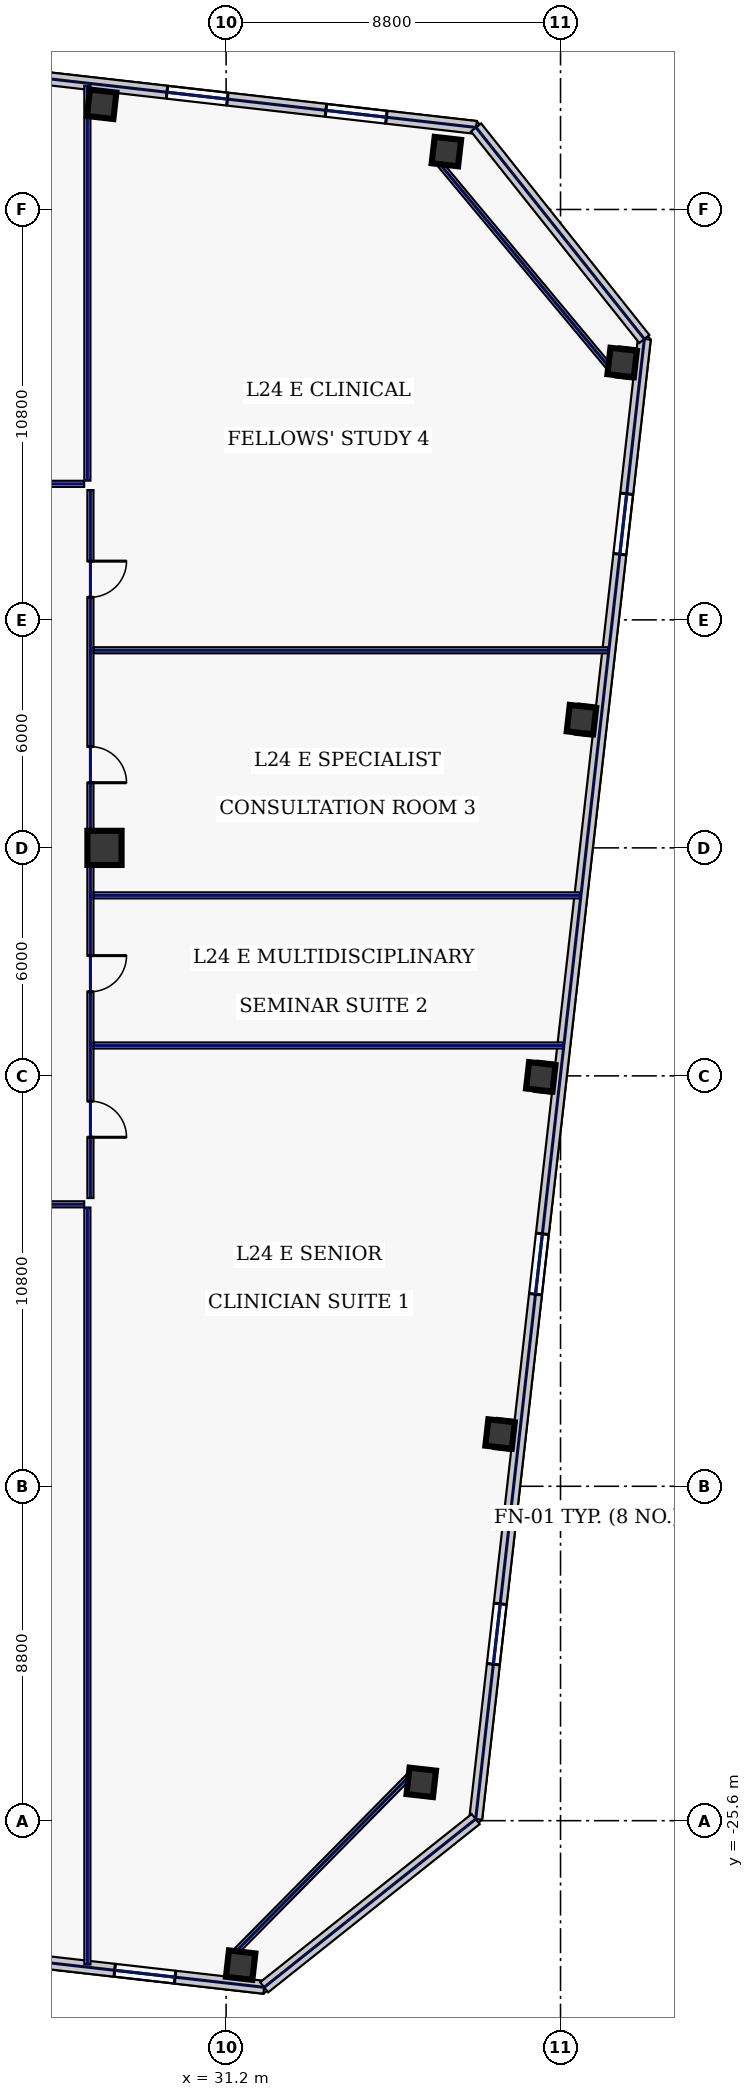
"""IFC4 building model, lengths in metres.
Left out: names, types, materials, properties, quantities, classifications, styles, units other than length and angle.
Written with IfcOpenShell. Run it as: python <this file> out.ifc"""

import sys

from ifc_helpers import new_model, si_unit, direction, frame, frame_2d, origin, origin_2d, place, context, subcontext, project, spatial, rectangle, hollow_rectangle, extrude, element, fill, save


model = new_model("IFC4")
c1 = context("Model", 3, precision=1e-05, world=origin(), true_north=direction((0.0, 1.0)))
c2 = subcontext(c1, "Body", "Model", "MODEL_VIEW")
j1 = project(units=[si_unit("LENGTHUNIT", "METRE"), si_unit("PLANEANGLEUNIT", "RADIAN")], contexts=[c1])
p1 = place(None, origin())
s1 = spatial("IfcSite", under=j1, at=p1, CompositionType="ELEMENT")
p2 = place(p1, origin())
s2 = spatial("IfcBuilding", under=s1, at=p2, CompositionType="ELEMENT")
p3 = place(p2, frame((0.0, 0.0, 109.4)))
s3 = spatial("IfcBuildingStorey", under=s2, at=p3, CompositionType="ELEMENT", Elevation=109.4)
p4 = place(p3, frame((28.0, 0.0, 0.0), z_axis=(0.0, 0.0, 1.0), x_axis=(1.0, 0.0, 0.0)))
e1 = element("IfcColumn", 1, at=p4, inside=s3, PredefinedType="COLUMN", context=c2, shape_type="SweptSolid", body=[
    extrude(hollow_rectangle(XDim=0.9, YDim=0.9, WallThickness=0.04, at=origin_2d()), origin(), (0.0, 0.0, 1.0), 3.74),
])
for number, where, z_axis, x_axis in (
    (2, (31.583, -29.401, 0.0), (0.0, 0.0, 1.0), (0.994, -0.113, 0.0)),
    (3, (36.997, 18.323, 0.0), (0.0, 0.0, 1.0), (0.994, -0.113, 0.0)),
    (4, (27.926, 19.568, 0.0), (0.0, 0.0, 1.0), (0.994, -0.113, 0.0)),
    (5, (36.336, -24.592, 0.0), (0.0, 0.0, 1.0), (0.994, -0.113, 0.0)),
    (6, (38.409, -15.424, 0.0), (0.0, 0.0, 1.0), (0.994, -0.113, 0.0)),
    (7, (39.48, -6.025, 0.0), (0.0, 0.0, 1.0), (0.994, -0.113, 0.0)),
    (8, (40.551, 3.375, 0.0), (0.0, 0.0, 1.0), (0.994, -0.113, 0.0)),
    (9, (41.622, 12.774, 0.0), (0.0, 0.0, 1.0), (0.994, -0.113, 0.0)),
):
    element("IfcColumn", number, at=place(p3, frame(where, z_axis=z_axis, x_axis=x_axis)), inside=s3, PredefinedType="COLUMN", context=c2, shape_type="SweptSolid", body=[
        extrude(hollow_rectangle(XDim=0.7, YDim=0.7, WallThickness=0.032, at=origin_2d()), origin(), (0.0, 0.0, 1.0), 3.74),
    ])
p5 = place(p3, frame((11.115, -27.582, 0.0), z_axis=(0.0, 0.0, 1.0), x_axis=(0.993572655904, -0.113196190044, 0.0)))
e10 = element("IfcWall", 10, at=p5, inside=s3, PredefinedType="STANDARD", context=c2, shape_type="SweptSolid", body=[
    extrude(rectangle(XDim=21.223, YDim=0.34, at=frame_2d((10.611, 0.0))), origin(), (0.0, 0.0, 1.0), 3.74),
])
p6 = place(p5, frame((13.044, 0.0, 0.22)))
e11 = element("IfcOpeningElement", 11, at=p6, cuts=e10, PredefinedType="OPENING", context=c2, shape_type="SweptSolid", body=[
    extrude(rectangle(XDim=1.6, YDim=1.2, at=frame_2d((0.8, 0.6))), frame((0.0, 0.18, 0.0), z_axis=(0.0, -1.0, 0.0), x_axis=(1.0, 0.0, 0.0)), (0.0, 0.0, 1.0), 0.36),
])
p7 = place(p5, frame((17.265, 0.0, 0.22)))
e12 = element("IfcOpeningElement", 12, at=p7, cuts=e10, PredefinedType="OPENING", context=c2, shape_type="SweptSolid", body=[
    extrude(rectangle(XDim=1.6, YDim=1.2, at=frame_2d((0.8, 0.6))), frame((0.0, 0.18, 0.0), z_axis=(0.0, -1.0, 0.0), x_axis=(1.0, 0.0, 0.0)), (0.0, 0.0, 1.0), 0.36),
])
p8 = place(p3, frame((37.777, 18.958, 0.0), z_axis=(0.0, 0.0, 1.0), x_axis=(-0.993571362037, 0.113207546299, 0.0)))
e13 = element("IfcWall", 13, at=p8, inside=s3, PredefinedType="STANDARD", context=c2, shape_type="SweptSolid", body=[
    extrude(rectangle(XDim=21.223, YDim=0.34, at=frame_2d((10.611, 0.0))), origin(), (0.0, 0.0, 1.0), 3.74),
])
p9 = place(p8, frame((11.535, 0.0, 0.22)))
e14 = element("IfcOpeningElement", 14, at=p9, cuts=e13, PredefinedType="OPENING", context=c2, shape_type="SweptSolid", body=[
    extrude(rectangle(XDim=1.6, YDim=1.2, at=frame_2d((0.8, 0.6))), frame((0.0, 0.18, 0.0), z_axis=(0.0, -1.0, 0.0), x_axis=(1.0, 0.0, 0.0)), (0.0, 0.0, 1.0), 0.36),
])
p10 = place(p8, frame((6.586, 0.0, 0.22)))
e15 = element("IfcOpeningElement", 15, at=p10, cuts=e13, PredefinedType="OPENING", context=c2, shape_type="SweptSolid", body=[
    extrude(rectangle(XDim=1.6, YDim=1.2, at=frame_2d((0.8, 0.6))), frame((0.0, 0.18, 0.0), z_axis=(0.0, -1.0, 0.0), x_axis=(1.0, 0.0, 0.0)), (0.0, 0.0, 1.0), 0.36),
])
p11 = place(p8, frame((2.375, 0.0, 0.22)))
e16 = element("IfcOpeningElement", 16, at=p11, cuts=e13, PredefinedType="OPENING", context=c2, shape_type="SweptSolid", body=[
    extrude(rectangle(XDim=1.6, YDim=1.2, at=frame_2d((0.8, 0.6))), frame((0.0, 0.18, 0.0), z_axis=(0.0, -1.0, 0.0), x_axis=(1.0, 0.0, 0.0)), (0.0, 0.0, 1.0), 0.36),
])
p12 = place(p3, frame((37.768, -25.556, 0.0), z_axis=(0.0, 0.0, 1.0), x_axis=(0.113201605824, 0.993572038877, 0.0)))
e17 = element("IfcWall", 17, at=p12, inside=s3, PredefinedType="STANDARD", context=c2, shape_type="SweptSolid", body=[
    extrude(rectangle(XDim=39.2, YDim=0.34, at=frame_2d((19.6, 0.0))), origin(), (0.0, 0.0, 1.0), 3.74),
])
p13 = place(p12, frame((4.1, 0.0, 0.22)))
e18 = element("IfcOpeningElement", 18, at=p13, cuts=e17, PredefinedType="OPENING", context=c2, shape_type="SweptSolid", body=[
    extrude(rectangle(XDim=1.6, YDim=1.2, at=frame_2d((0.8, 0.6))), frame((0.0, 0.18, 0.0), z_axis=(0.0, -1.0, 0.0), x_axis=(1.0, 0.0, 0.0)), (0.0, 0.0, 1.0), 0.36),
])
p14 = place(p12, frame((13.9, 0.0, 0.22)))
e19 = element("IfcOpeningElement", 19, at=p14, cuts=e17, PredefinedType="OPENING", context=c2, shape_type="SweptSolid", body=[
    extrude(rectangle(XDim=1.6, YDim=1.2, at=frame_2d((0.8, 0.6))), frame((0.0, 0.18, 0.0), z_axis=(0.0, -1.0, 0.0), x_axis=(1.0, 0.0, 0.0)), (0.0, 0.0, 1.0), 0.36),
])
p15 = place(p12, frame((33.5, 0.0, 0.22)))
e20 = element("IfcOpeningElement", 20, at=p15, cuts=e17, PredefinedType="OPENING", context=c2, shape_type="SweptSolid", body=[
    extrude(rectangle(XDim=1.6, YDim=1.2, at=frame_2d((0.8, 0.6))), frame((0.0, 0.18, 0.0), z_axis=(0.0, -1.0, 0.0), x_axis=(1.0, 0.0, 0.0)), (0.0, 0.0, 1.0), 0.36),
])
p16 = place(p3, frame((32.201, -29.985, 0.0), z_axis=(0.0, 0.0, 1.0), x_axis=(0.78261359446, 0.622507800567, 0.0)))
e21 = element("IfcWall", 21, at=p16, inside=s3, PredefinedType="STANDARD", context=c2, shape_type="SweptSolid", body=[
    extrude(rectangle(XDim=7.114, YDim=0.34, at=frame_2d((3.557, 0.0))), origin(), (0.0, 0.0, 1.0), 3.74),
])
p17 = place(p3, frame((42.206, 13.392, 0.0), z_axis=(0.0, 0.0, 1.0), x_axis=(-0.622524521309, 0.782600294128, 0.0)))
e22 = element("IfcWall", 22, at=p17, inside=s3, PredefinedType="STANDARD", context=c2, shape_type="SweptSolid", body=[
    extrude(rectangle(XDim=7.113, YDim=0.34, at=frame_2d((3.557, 0.0))), origin(), (0.0, 0.0, 1.0), 3.74),
])
p18 = place(p3, frame((31.341, -29.162, 0.0), z_axis=(0.0, 0.0, 1.0), x_axis=(0.702905898933, 0.711282853192, 0.0)))
e23 = element("IfcWall", 23, at=p18, inside=s3, PredefinedType="PARTITIONING", context=c2, shape_type="SweptSolid", body=[
    extrude(rectangle(XDim=6.761, YDim=0.16, at=frame_2d((3.381, 0.0))), origin(), (0.0, 0.0, 1.0), 1.535),
])
p19 = place(p3, frame((41.361, 12.556, 0.0), z_axis=(0.0, 0.0, 1.0), x_axis=(-0.640217638562, 0.768193579298, 0.0)))
e24 = element("IfcWall", 24, at=p19, inside=s3, PredefinedType="PARTITIONING", context=c2, shape_type="SweptSolid", body=[
    extrude(rectangle(XDim=7.224, YDim=0.16, at=frame_2d((3.612, 0.0))), origin(), (0.0, 0.0, 1.0), 1.535),
])
p20 = place(p3, frame((-27.465, 9.58, 0.0), z_axis=(0.0, 0.0, 1.0), x_axis=(1.0, 0.0, 0.0)))
e25 = element("IfcWall", 25, at=p20, inside=s3, PredefinedType="PARTITIONING", context=c2, shape_type="SweptSolid", body=[
    extrude(rectangle(XDim=54.93, YDim=0.16, at=frame_2d((27.465, 0.0))), origin(), (0.0, 0.0, 1.0), 3.74),
])
p21 = place(p20, frame((1.869, 0.0, 0.0)))
e26 = element("IfcOpeningElement", 26, at=p21, cuts=e25, PredefinedType="OPENING", context=c2, shape_type="SweptSolid", body=[
    extrude(rectangle(XDim=1.3, YDim=2.2, at=frame_2d((0.65, 1.1))), frame((0.0, 0.09, 0.0), z_axis=(0.0, -1.0, 0.0), x_axis=(1.0, 0.0, 0.0)), (0.0, 0.0, 1.0), 0.18),
])
p22 = place(p20, frame((6.375, 0.0, 0.0)))
e27 = element("IfcOpeningElement", 27, at=p22, cuts=e25, PredefinedType="OPENING", context=c2, shape_type="SweptSolid", body=[
    extrude(rectangle(XDim=0.95, YDim=2.2, at=frame_2d((0.475, 1.1))), frame((0.0, 0.09, 0.0), z_axis=(0.0, -1.0, 0.0), x_axis=(1.0, 0.0, 0.0)), (0.0, 0.0, 1.0), 0.18),
])
p23 = place(p20, frame((13.1, 0.0, 0.0)))
e28 = element("IfcOpeningElement", 28, at=p23, cuts=e25, PredefinedType="OPENING", context=c2, shape_type="SweptSolid", body=[
    extrude(rectangle(XDim=1.3, YDim=2.2, at=frame_2d((0.65, 1.1))), frame((0.0, 0.09, 0.0), z_axis=(0.0, -1.0, 0.0), x_axis=(1.0, 0.0, 0.0)), (0.0, 0.0, 1.0), 0.18),
])
p24 = place(p20, frame((23.225, 0.0, 0.0)))
e29 = element("IfcOpeningElement", 29, at=p24, cuts=e25, PredefinedType="OPENING", context=c2, shape_type="SweptSolid", body=[
    extrude(rectangle(XDim=0.95, YDim=2.2, at=frame_2d((0.475, 1.1))), frame((0.0, 0.09, 0.0), z_axis=(0.0, -1.0, 0.0), x_axis=(1.0, 0.0, 0.0)), (0.0, 0.0, 1.0), 0.18),
])
p25 = place(p20, frame((33.725, 0.0, 0.0)))
e30 = element("IfcOpeningElement", 30, at=p25, cuts=e25, PredefinedType="OPENING", context=c2, shape_type="SweptSolid", body=[
    extrude(rectangle(XDim=0.95, YDim=2.2, at=frame_2d((0.475, 1.1))), frame((0.0, 0.09, 0.0), z_axis=(0.0, -1.0, 0.0), x_axis=(1.0, 0.0, 0.0)), (0.0, 0.0, 1.0), 0.18),
])
p26 = place(p20, frame((43.325, 0.0, 0.0)))
e31 = element("IfcOpeningElement", 31, at=p26, cuts=e25, PredefinedType="OPENING", context=c2, shape_type="SweptSolid", body=[
    extrude(rectangle(XDim=1.05, YDim=2.2, at=frame_2d((0.525, 1.1))), frame((0.0, 0.09, 0.0), z_axis=(0.0, -1.0, 0.0), x_axis=(1.0, 0.0, 0.0)), (0.0, 0.0, 1.0), 0.18),
])
p27 = place(p20, frame((50.781, 0.0, 0.0)))
e32 = element("IfcOpeningElement", 32, at=p27, cuts=e25, PredefinedType="OPENING", context=c2, shape_type="SweptSolid", body=[
    extrude(rectangle(XDim=1.3, YDim=2.2, at=frame_2d((0.65, 1.1))), frame((0.0, 0.09, 0.0), z_axis=(0.0, -1.0, 0.0), x_axis=(1.0, 0.0, 0.0)), (0.0, 0.0, 1.0), 0.18),
])
p28 = place(p3, frame((27.63, 9.415, 0.0), z_axis=(0.0, 0.0, 1.0), x_axis=(0.0, -1.0, 0.0)))
e33 = element("IfcWall", 33, at=p28, inside=s3, PredefinedType="PARTITIONING", context=c2, shape_type="SweptSolid", body=[
    extrude(rectangle(XDim=18.63, YDim=0.16, at=frame_2d((9.315, 0.0))), origin(), (0.0, 0.0, 1.0), 3.74),
])
p29 = place(p28, frame((16.081, 0.0, 0.0)))
e34 = element("IfcOpeningElement", 34, at=p29, cuts=e33, PredefinedType="OPENING", context=c2, shape_type="SweptSolid", body=[
    extrude(rectangle(XDim=0.95, YDim=2.2, at=frame_2d((0.475, 1.1))), frame((0.0, 0.09, 0.0), z_axis=(0.0, -1.0, 0.0), x_axis=(1.0, 0.0, 0.0)), (0.0, 0.0, 1.0), 0.18),
])
p30 = place(p28, frame((12.25, 0.0, 0.0)))
e35 = element("IfcOpeningElement", 35, at=p30, cuts=e33, PredefinedType="OPENING", context=c2, shape_type="SweptSolid", body=[
    extrude(rectangle(XDim=0.95, YDim=2.2, at=frame_2d((0.475, 1.1))), frame((0.0, 0.09, 0.0), z_axis=(0.0, -1.0, 0.0), x_axis=(1.0, 0.0, 0.0)), (0.0, 0.0, 1.0), 0.18),
])
p31 = place(p28, frame((6.75, 0.0, 0.0)))
e36 = element("IfcOpeningElement", 36, at=p31, cuts=e33, PredefinedType="OPENING", context=c2, shape_type="SweptSolid", body=[
    extrude(rectangle(XDim=0.95, YDim=2.2, at=frame_2d((0.475, 1.1))), frame((0.0, 0.09, 0.0), z_axis=(0.0, -1.0, 0.0), x_axis=(1.0, 0.0, 0.0)), (0.0, 0.0, 1.0), 0.18),
])
p32 = place(p28, frame((1.869, 0.0, 0.0)))
e37 = element("IfcOpeningElement", 37, at=p32, cuts=e33, PredefinedType="OPENING", context=c2, shape_type="SweptSolid", body=[
    extrude(rectangle(XDim=0.95, YDim=2.2, at=frame_2d((0.475, 1.1))), frame((0.0, 0.09, 0.0), z_axis=(0.0, -1.0, 0.0), x_axis=(1.0, 0.0, 0.0)), (0.0, 0.0, 1.0), 0.18),
])
p33 = place(p3, frame((27.465, -9.38, 0.0), z_axis=(0.0, 0.0, 1.0), x_axis=(-1.0, 0.0, 0.0)))
e38 = element("IfcWall", 38, at=p33, inside=s3, PredefinedType="PARTITIONING", context=c2, shape_type="SweptSolid", body=[
    extrude(rectangle(XDim=54.93, YDim=0.16, at=frame_2d((27.465, 0.0))), origin(), (0.0, 0.0, 1.0), 3.74),
])
p34 = place(p33, frame((51.931, 0.0, 0.0)))
e39 = element("IfcOpeningElement", 39, at=p34, cuts=e38, PredefinedType="OPENING", context=c2, shape_type="SweptSolid", body=[
    extrude(rectangle(XDim=1.45, YDim=2.2, at=frame_2d((0.725, 1.1))), frame((0.0, 0.09, 0.0), z_axis=(0.0, -1.0, 0.0), x_axis=(1.0, 0.0, 0.0)), (0.0, 0.0, 1.0), 0.18),
])
p35 = place(p33, frame((45.605, 0.0, 0.0)))
e40 = element("IfcOpeningElement", 40, at=p35, cuts=e38, PredefinedType="OPENING", context=c2, shape_type="SweptSolid", body=[
    extrude(rectangle(XDim=0.95, YDim=2.2, at=frame_2d((0.475, 1.1))), frame((0.0, 0.09, 0.0), z_axis=(0.0, -1.0, 0.0), x_axis=(1.0, 0.0, 0.0)), (0.0, 0.0, 1.0), 0.18),
])
p36 = place(p33, frame((38.485, 0.0, 0.0)))
e41 = element("IfcOpeningElement", 41, at=p36, cuts=e38, PredefinedType="OPENING", context=c2, shape_type="SweptSolid", body=[
    extrude(rectangle(XDim=0.95, YDim=2.2, at=frame_2d((0.475, 1.1))), frame((0.0, 0.09, 0.0), z_axis=(0.0, -1.0, 0.0), x_axis=(1.0, 0.0, 0.0)), (0.0, 0.0, 1.0), 0.18),
])
p37 = place(p33, frame((33.435, 0.0, 0.0)))
e42 = element("IfcOpeningElement", 42, at=p37, cuts=e38, PredefinedType="OPENING", context=c2, shape_type="SweptSolid", body=[
    extrude(rectangle(XDim=1.05, YDim=2.2, at=frame_2d((0.525, 1.1))), frame((0.0, 0.09, 0.0), z_axis=(0.0, -1.0, 0.0), x_axis=(1.0, 0.0, 0.0)), (0.0, 0.0, 1.0), 0.18),
])
p38 = place(p33, frame((27.435, 0.0, 0.0)))
e43 = element("IfcOpeningElement", 43, at=p38, cuts=e38, PredefinedType="OPENING", context=c2, shape_type="SweptSolid", body=[
    extrude(rectangle(XDim=0.95, YDim=2.2, at=frame_2d((0.475, 1.1))), frame((0.0, 0.09, 0.0), z_axis=(0.0, -1.0, 0.0), x_axis=(1.0, 0.0, 0.0)), (0.0, 0.0, 1.0), 0.18),
])
p39 = place(p33, frame((20.03, 0.0, 0.0)))
e44 = element("IfcOpeningElement", 44, at=p39, cuts=e38, PredefinedType="OPENING", context=c2, shape_type="SweptSolid", body=[
    extrude(rectangle(XDim=1.3, YDim=2.2, at=frame_2d((0.65, 1.1))), frame((0.0, 0.09, 0.0), z_axis=(0.0, -1.0, 0.0), x_axis=(1.0, 0.0, 0.0)), (0.0, 0.0, 1.0), 0.18),
])
p40 = place(p33, frame((14.175, 0.0, 0.0)))
e45 = element("IfcOpeningElement", 45, at=p40, cuts=e38, PredefinedType="OPENING", context=c2, shape_type="SweptSolid", body=[
    extrude(rectangle(XDim=1.45, YDim=2.2, at=frame_2d((0.725, 1.1))), frame((0.0, 0.09, 0.0), z_axis=(0.0, -1.0, 0.0), x_axis=(1.0, 0.0, 0.0)), (0.0, 0.0, 1.0), 0.18),
])
p41 = place(p33, frame((10.15, 0.0, 0.0)))
e46 = element("IfcOpeningElement", 46, at=p41, cuts=e38, PredefinedType="OPENING", context=c2, shape_type="SweptSolid", body=[
    extrude(rectangle(XDim=1.15, YDim=2.2, at=frame_2d((0.575, 1.1))), frame((0.0, 0.09, 0.0), z_axis=(0.0, -1.0, 0.0), x_axis=(1.0, 0.0, 0.0)), (0.0, 0.0, 1.0), 0.18),
])
p42 = place(p33, frame((6.225, 0.0, 0.0)))
e47 = element("IfcOpeningElement", 47, at=p42, cuts=e38, PredefinedType="OPENING", context=c2, shape_type="SweptSolid", body=[
    extrude(rectangle(XDim=1.05, YDim=2.2, at=frame_2d((0.525, 1.1))), frame((0.0, 0.09, 0.0), z_axis=(0.0, -1.0, 0.0), x_axis=(1.0, 0.0, 0.0)), (0.0, 0.0, 1.0), 0.18),
])
p43 = place(p33, frame((2.044, 0.0, 0.0)))
e48 = element("IfcOpeningElement", 48, at=p43, cuts=e38, PredefinedType="OPENING", context=c2, shape_type="SweptSolid", body=[
    extrude(rectangle(XDim=0.95, YDim=2.2, at=frame_2d((0.475, 1.1))), frame((0.0, 0.09, 0.0), z_axis=(0.0, -1.0, 0.0), x_axis=(1.0, 0.0, 0.0)), (0.0, 0.0, 1.0), 0.18),
])
p44 = place(p3, frame((27.55, 9.665, 0.0), z_axis=(0.0, 0.0, 1.0), x_axis=(0.0, 1.0, 0.0)))
e49 = element("IfcWall", 49, at=p44, inside=s3, PredefinedType="PARTITIONING", context=c2, shape_type="SweptSolid", body=[
    extrude(rectangle(XDim=10.388, YDim=0.16, at=frame_2d((5.194, 0.0))), origin(), (0.0, 0.0, 1.0), 3.74),
])
p45 = place(p3, frame((27.55, -29.385, 0.0), z_axis=(0.0, 0.0, 1.0), x_axis=(0.0, 1.0, 0.0)))
e50 = element("IfcWall", 50, at=p45, inside=s3, PredefinedType="PARTITIONING", context=c2, shape_type="SweptSolid", body=[
    extrude(rectangle(XDim=19.919, YDim=0.16, at=frame_2d((9.96, 0.0))), origin(), (0.0, 0.0, 1.0), 3.74),
])
p46 = place(p3, frame((27.715, -5.2, 0.0), z_axis=(0.0, 0.0, 1.0), x_axis=(1.0, 0.0, 0.0)))
e51 = element("IfcWall", 51, at=p46, inside=s3, PredefinedType="PARTITIONING", context=c2, shape_type="SweptSolid", body=[
    extrude(rectangle(XDim=12.352, YDim=0.16, at=frame_2d((6.176, 0.0))), origin(), (0.0, 0.0, 1.0), 3.74),
])
p47 = place(p3, frame((27.715, -1.25, 0.0), z_axis=(0.0, 0.0, 1.0), x_axis=(1.0, 0.0, 0.0)))
e52 = element("IfcWall", 52, at=p47, inside=s3, PredefinedType="PARTITIONING", context=c2, shape_type="SweptSolid", body=[
    extrude(rectangle(XDim=12.802, YDim=0.16, at=frame_2d((6.401, 0.0))), origin(), (0.0, 0.0, 1.0), 3.74),
])
p48 = place(p3, frame((27.715, 5.2, 0.0), z_axis=(0.0, 0.0, 1.0), x_axis=(1.0, 0.0, 0.0)))
e53 = element("IfcWall", 53, at=p48, inside=s3, PredefinedType="PARTITIONING", context=c2, shape_type="SweptSolid", body=[
    extrude(rectangle(XDim=13.537, YDim=0.16, at=frame_2d((6.769, 0.0))), origin(), (0.0, 0.0, 1.0), 3.74),
])
p49 = place(p7, origin())
e54 = element("IfcWindow", 54, at=p49, inside=s3, PartitioningType="SINGLE_PANEL", PredefinedType="WINDOW", context=c2, shape_type="SweptSolid", body=[
    extrude(rectangle(XDim=1.6, YDim=1.2, at=frame_2d((0.8, 0.6))), frame((0.0, 0.03, 0.0), z_axis=(0.0, -1.0, 0.0), x_axis=(1.0, 0.0, 0.0)), (0.0, 0.0, 1.0), 0.06),
])
fill(e12, e54)
p50 = place(p10, origin())
e55 = element("IfcWindow", 55, at=p50, inside=s3, PartitioningType="SINGLE_PANEL", PredefinedType="WINDOW", context=c2, shape_type="SweptSolid", body=[
    extrude(rectangle(XDim=1.6, YDim=1.2, at=frame_2d((0.8, 0.6))), frame((0.0, 0.03, 0.0), z_axis=(0.0, -1.0, 0.0), x_axis=(1.0, 0.0, 0.0)), (0.0, 0.0, 1.0), 0.06),
])
fill(e15, e55)
p51 = place(p11, origin())
e56 = element("IfcWindow", 56, at=p51, inside=s3, PartitioningType="SINGLE_PANEL", PredefinedType="WINDOW", context=c2, shape_type="SweptSolid", body=[
    extrude(rectangle(XDim=1.6, YDim=1.2, at=frame_2d((0.8, 0.6))), frame((0.0, 0.03, 0.0), z_axis=(0.0, -1.0, 0.0), x_axis=(1.0, 0.0, 0.0)), (0.0, 0.0, 1.0), 0.06),
])
fill(e16, e56)
p52 = place(p13, origin())
e57 = element("IfcWindow", 57, at=p52, inside=s3, PartitioningType="SINGLE_PANEL", PredefinedType="WINDOW", context=c2, shape_type="SweptSolid", body=[
    extrude(rectangle(XDim=1.6, YDim=1.2, at=frame_2d((0.8, 0.6))), frame((0.0, 0.03, 0.0), z_axis=(0.0, -1.0, 0.0), x_axis=(1.0, 0.0, 0.0)), (0.0, 0.0, 1.0), 0.06),
])
fill(e18, e57)
p53 = place(p14, origin())
e58 = element("IfcWindow", 58, at=p53, inside=s3, PartitioningType="SINGLE_PANEL", PredefinedType="WINDOW", context=c2, shape_type="SweptSolid", body=[
    extrude(rectangle(XDim=1.6, YDim=1.2, at=frame_2d((0.8, 0.6))), frame((0.0, 0.03, 0.0), z_axis=(0.0, -1.0, 0.0), x_axis=(1.0, 0.0, 0.0)), (0.0, 0.0, 1.0), 0.06),
])
fill(e19, e58)
p54 = place(p15, origin())
e59 = element("IfcWindow", 59, at=p54, inside=s3, PartitioningType="SINGLE_PANEL", PredefinedType="WINDOW", context=c2, shape_type="SweptSolid", body=[
    extrude(rectangle(XDim=1.6, YDim=1.2, at=frame_2d((0.8, 0.6))), frame((0.0, 0.03, 0.0), z_axis=(0.0, -1.0, 0.0), x_axis=(1.0, 0.0, 0.0)), (0.0, 0.0, 1.0), 0.06),
])
fill(e20, e59)
p55 = place(p29, origin())
e60 = element("IfcDoor", 60, at=p55, inside=s3, OperationType="SINGLE_SWING_RIGHT", PredefinedType="DOOR", context=c2, shape_type="SweptSolid", body=[
    extrude(rectangle(XDim=0.95, YDim=2.2, at=frame_2d((0.475, 1.1))), frame((0.0, 0.025, 0.0), z_axis=(0.0, -1.0, 0.0), x_axis=(1.0, 0.0, 0.0)), (0.0, 0.0, 1.0), 0.05),
])
fill(e34, e60)
p56 = place(p30, origin())
e61 = element("IfcDoor", 61, at=p56, inside=s3, OperationType="SINGLE_SWING_LEFT", PredefinedType="DOOR", context=c2, shape_type="SweptSolid", body=[
    extrude(rectangle(XDim=0.95, YDim=2.2, at=frame_2d((0.475, 1.1))), frame((0.0, 0.025, 0.0), z_axis=(0.0, -1.0, 0.0), x_axis=(1.0, 0.0, 0.0)), (0.0, 0.0, 1.0), 0.05),
])
fill(e35, e61)
p57 = place(p31, origin())
e62 = element("IfcDoor", 62, at=p57, inside=s3, OperationType="SINGLE_SWING_RIGHT", PredefinedType="DOOR", context=c2, shape_type="SweptSolid", body=[
    extrude(rectangle(XDim=0.95, YDim=2.2, at=frame_2d((0.475, 1.1))), frame((0.0, 0.025, 0.0), z_axis=(0.0, -1.0, 0.0), x_axis=(1.0, 0.0, 0.0)), (0.0, 0.0, 1.0), 0.05),
])
fill(e36, e62)
p58 = place(p32, origin())
e63 = element("IfcDoor", 63, at=p58, inside=s3, OperationType="SINGLE_SWING_LEFT", PredefinedType="DOOR", context=c2, shape_type="SweptSolid", body=[
    extrude(rectangle(XDim=0.95, YDim=2.2, at=frame_2d((0.475, 1.1))), frame((0.0, 0.025, 0.0), z_axis=(0.0, -1.0, 0.0), x_axis=(1.0, 0.0, 0.0)), (0.0, 0.0, 1.0), 0.05),
])
fill(e37, e63)
save(model, sys.argv[1])
